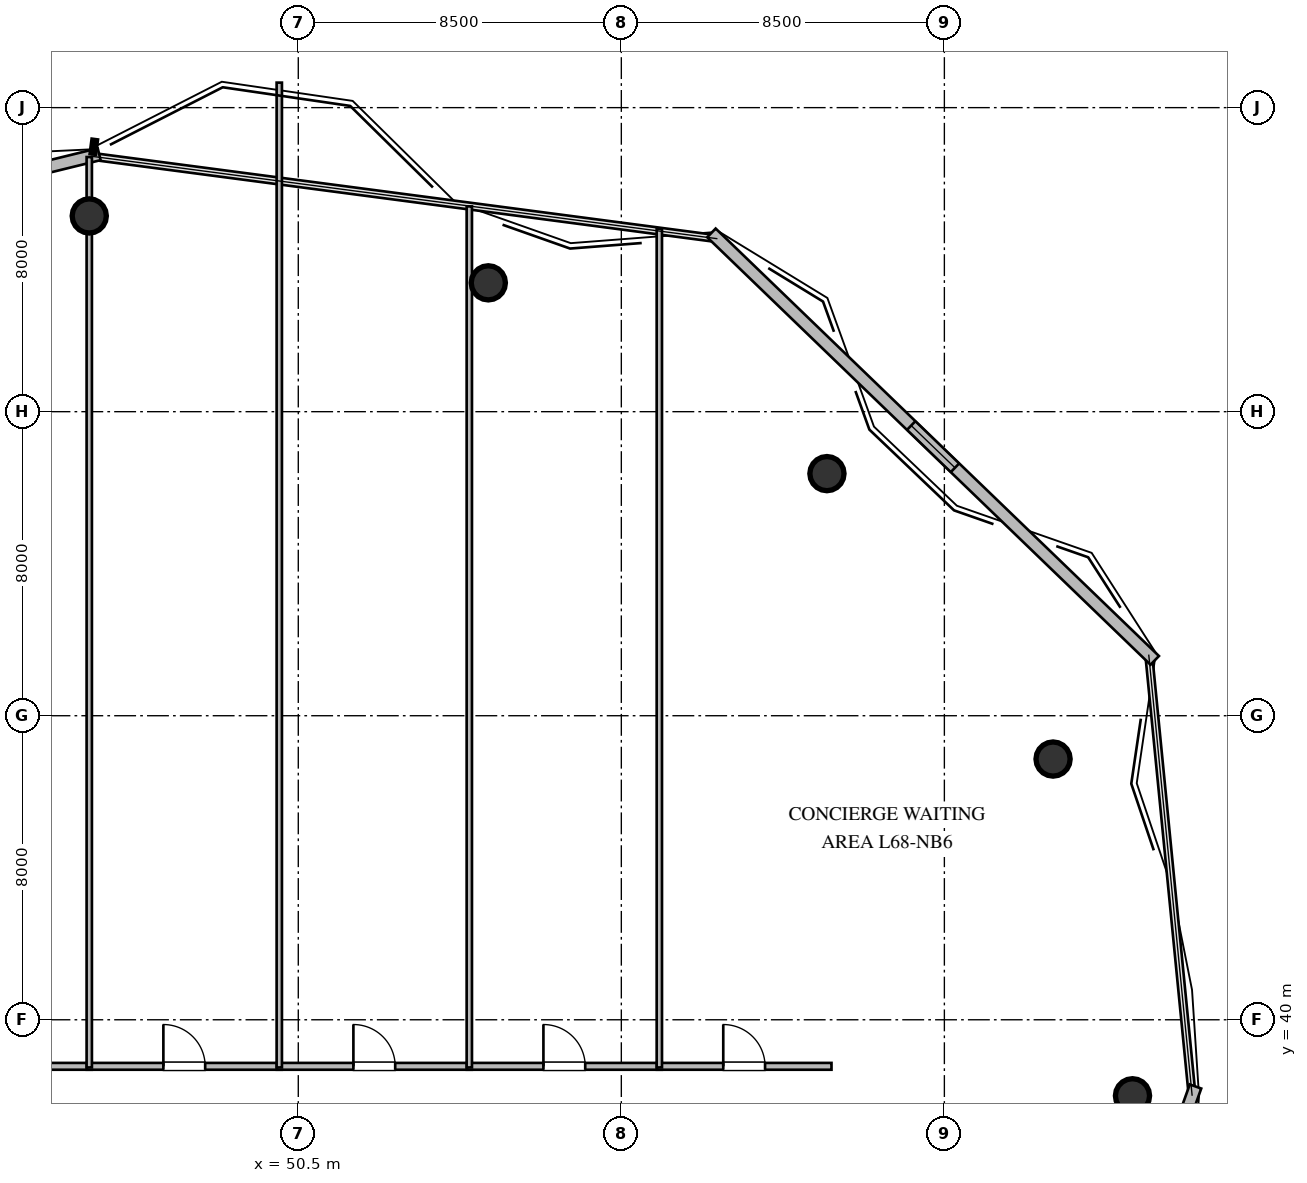
"""IFC4 building model, lengths in metres.
Left out: names, types, materials, properties, quantities, classifications, styles, units other than length and angle.
Written with IfcOpenShell. Run it as: python <this file> out.ifc"""

import sys

from ifc_helpers import new_model, si_unit, direction, frame, frame_2d, origin, origin_2d, place, context, subcontext, project, spatial, rectangle, circle, extrude, element, fill, save


model = new_model("IFC4")
c1 = context("Model", 3, precision=1e-05, world=origin(), true_north=direction((0.0, 1.0)))
c2 = subcontext(c1, "Body", "Model", "MODEL_VIEW")
j1 = project(units=[si_unit("LENGTHUNIT", "METRE"), si_unit("PLANEANGLEUNIT", "RADIAN")], contexts=[c1])
p1 = place(None, origin())
s1 = spatial("IfcSite", under=j1, at=p1, CompositionType="ELEMENT")
p2 = place(p1, origin())
s2 = spatial("IfcBuilding", under=s1, at=p2, CompositionType="ELEMENT")
p3 = place(p2, frame((0.0, 0.0, 258.6)))
s3 = spatial("IfcBuildingStorey", under=s2, at=p3, CompositionType="ELEMENT", Elevation=258.6)
for number, where, z_axis, x_axis in (
    (1, (72.45, 38.0, -0.24), (0.0, 0.0, 1.0), (1.0, 0.0, 0.0)),
    (2, (70.36, 46.86, -0.24), (0.0, 0.0, 1.0), (1.0, 0.0, 0.0)),
    (3, (64.41, 54.37, -0.24), (0.0, 0.0, 1.0), (1.0, 0.0, 0.0)),
    (4, (55.5, 59.39, -0.24), (0.0, 0.0, 1.0), (1.0, 0.0, 0.0)),
    (5, (45.0, 61.15, -0.24), (0.0, 0.0, 1.0), (1.0, 0.0, 0.0)),
):
    element("IfcColumn", number, at=place(p3, frame(where, z_axis=z_axis, x_axis=x_axis)), inside=s3, PredefinedType="COLUMN", context=c2, shape_type="SweptSolid", body=[
        extrude(circle(Radius=0.45, at=origin_2d()), origin(), (0.0, 0.0, 1.0), 4.04),
    ])
p4 = place(p3, frame((74.108, 38.245, 0.0), z_axis=(0.0, 0.0, 1.0), x_axis=(-0.337073777429, -0.941478235845, 0.0)))
e6 = element("IfcWall", 6, at=p4, inside=s3, PredefinedType="STANDARD", context=c2, shape_type="SweptSolid", body=[
    extrude(rectangle(XDim=13.673, YDim=0.32, at=frame_2d((6.837, 0.0))), origin(), (0.0, 0.0, 1.0), 3.56),
])
p5 = place(p3, frame((29.293, 58.852, 0.0), z_axis=(0.0, 0.0, 1.0), x_axis=(0.971137749742, 0.238519330508, 0.0)))
e7 = element("IfcWall", 7, at=p5, inside=s3, PredefinedType="STANDARD", context=c2, shape_type="SweptSolid", body=[
    extrude(rectangle(XDim=16.443, YDim=0.32, at=frame_2d((8.221, 0.0))), origin(), (0.0, 0.0, 1.0), 3.56),
])
p6 = place(p5, frame((7.421, 0.0, 1.05)))
e8 = element("IfcOpeningElement", 8, at=p6, cuts=e7, PredefinedType="OPENING", context=c2, shape_type="SweptSolid", body=[
    extrude(rectangle(XDim=1.6, YDim=1.5, at=frame_2d((0.8, 0.75))), frame((0.0, 0.17, 0.0), z_axis=(0.0, -1.0, 0.0), x_axis=(1.0, 0.0, 0.0)), (0.0, 0.0, 1.0), 0.34),
])
p7 = place(p3, frame((61.371, 60.704, 0.0), z_axis=(0.0, 0.0, 1.0), x_axis=(0.719819827488, -0.694160943842, 0.0)))
e9 = element("IfcWall", 9, at=p7, inside=s3, PredefinedType="STANDARD", context=c2, shape_type="SweptSolid", body=[
    extrude(rectangle(XDim=16.204, YDim=0.32, at=frame_2d((8.102, 0.0))), origin(), (0.0, 0.0, 1.0), 3.56),
])
p8 = place(p7, frame((7.302, 0.0, 1.05)))
e10 = element("IfcOpeningElement", 10, at=p8, cuts=e9, PredefinedType="OPENING", context=c2, shape_type="SweptSolid", body=[
    extrude(rectangle(XDim=1.6, YDim=1.5, at=frame_2d((0.8, 0.75))), frame((0.0, 0.17, 0.0), z_axis=(0.0, -1.0, 0.0), x_axis=(1.0, 0.0, 0.0)), (0.0, 0.0, 1.0), 0.34),
])
p9 = place(p3, frame((39.935, 38.775, 0.0), z_axis=(0.0, 0.0, 1.0), x_axis=(1.0, 0.0, 0.0)))
e11 = element("IfcWall", 11, at=p9, inside=s3, PredefinedType="PARTITIONING", context=c2, shape_type="SweptSolid", body=[
    extrude(rectangle(XDim=5.13, YDim=0.18, at=frame_2d((2.565, 0.0))), origin(), (0.0, 0.0, 1.0), 3.56),
])
p10 = place(p9, frame((2.015, 0.0, 0.0)))
e12 = element("IfcOpeningElement", 12, at=p10, cuts=e11, PredefinedType="OPENING", context=c2, shape_type="SweptSolid", body=[
    extrude(rectangle(XDim=1.1, YDim=2.1, at=frame_2d((0.55, 1.05))), frame((0.0, 0.1, 0.0), z_axis=(0.0, -1.0, 0.0), x_axis=(1.0, 0.0, 0.0)), (0.0, 0.0, 1.0), 0.2),
])
p11 = place(p3, frame((44.935, 38.775, 0.0), z_axis=(0.0, 0.0, 1.0), x_axis=(1.0, 0.0, 0.0)))
e13 = element("IfcWall", 13, at=p11, inside=s3, PredefinedType="PARTITIONING", context=c2, shape_type="SweptSolid", body=[
    extrude(rectangle(XDim=5.13, YDim=0.18, at=frame_2d((2.565, 0.0))), origin(), (0.0, 0.0, 1.0), 3.56),
])
p12 = place(p11, frame((2.015, 0.0, 0.0)))
e14 = element("IfcOpeningElement", 14, at=p12, cuts=e13, PredefinedType="OPENING", context=c2, shape_type="SweptSolid", body=[
    extrude(rectangle(XDim=1.1, YDim=2.1, at=frame_2d((0.55, 1.05))), frame((0.0, 0.1, 0.0), z_axis=(0.0, -1.0, 0.0), x_axis=(1.0, 0.0, 0.0)), (0.0, 0.0, 1.0), 0.2),
])
p13 = place(p3, frame((49.935, 38.775, 0.0), z_axis=(0.0, 0.0, 1.0), x_axis=(1.0, 0.0, 0.0)))
e15 = element("IfcWall", 15, at=p13, inside=s3, PredefinedType="PARTITIONING", context=c2, shape_type="SweptSolid", body=[
    extrude(rectangle(XDim=5.13, YDim=0.18, at=frame_2d((2.565, 0.0))), origin(), (0.0, 0.0, 1.0), 3.56),
])
p14 = place(p13, frame((2.015, 0.0, 0.0)))
e16 = element("IfcOpeningElement", 16, at=p14, cuts=e15, PredefinedType="OPENING", context=c2, shape_type="SweptSolid", body=[
    extrude(rectangle(XDim=1.1, YDim=2.1, at=frame_2d((0.55, 1.05))), frame((0.0, 0.1, 0.0), z_axis=(0.0, -1.0, 0.0), x_axis=(1.0, 0.0, 0.0)), (0.0, 0.0, 1.0), 0.2),
])
p15 = place(p3, frame((54.935, 38.775, 0.0), z_axis=(0.0, 0.0, 1.0), x_axis=(1.0, 0.0, 0.0)))
e17 = element("IfcWall", 17, at=p15, inside=s3, PredefinedType="PARTITIONING", context=c2, shape_type="SweptSolid", body=[
    extrude(rectangle(XDim=5.13, YDim=0.18, at=frame_2d((2.565, 0.0))), origin(), (0.0, 0.0, 1.0), 3.56),
])
p16 = place(p15, frame((2.015, 0.0, 0.0)))
e18 = element("IfcOpeningElement", 18, at=p16, cuts=e17, PredefinedType="OPENING", context=c2, shape_type="SweptSolid", body=[
    extrude(rectangle(XDim=1.1, YDim=2.1, at=frame_2d((0.55, 1.05))), frame((0.0, 0.1, 0.0), z_axis=(0.0, -1.0, 0.0), x_axis=(1.0, 0.0, 0.0)), (0.0, 0.0, 1.0), 0.2),
])
p17 = place(p3, frame((59.935, 38.775, 0.0), z_axis=(0.0, 0.0, 1.0), x_axis=(1.0, 0.0, 0.0)))
e19 = element("IfcWall", 19, at=p17, inside=s3, PredefinedType="PARTITIONING", context=c2, shape_type="SweptSolid", body=[
    extrude(rectangle(XDim=4.595, YDim=0.18, at=frame_2d((2.297, 0.0))), origin(), (0.0, 0.0, 1.0), 3.56),
])
p18 = place(p17, frame((1.747, 0.0, 0.0)))
e20 = element("IfcOpeningElement", 20, at=p18, cuts=e19, PredefinedType="OPENING", context=c2, shape_type="SweptSolid", body=[
    extrude(rectangle(XDim=1.1, YDim=2.1, at=frame_2d((0.55, 1.05))), frame((0.0, 0.1, 0.0), z_axis=(0.0, -1.0, 0.0), x_axis=(1.0, 0.0, 0.0)), (0.0, 0.0, 1.0), 0.2),
])
p19 = place(p3, frame((45.0, 62.7, 0.0), z_axis=(0.0, 0.0, 1.0), x_axis=(0.0, -1.0, 0.0)))
e21 = element("IfcWall", 21, at=p19, inside=s3, PredefinedType="PARTITIONING", context=c2, shape_type="SweptSolid", body=[
    extrude(rectangle(XDim=23.955, YDim=0.14, at=frame_2d((11.978, 0.0))), origin(), (0.0, 0.0, 1.0), 3.006),
])
p20 = place(p3, frame((50.0, 64.658, 0.0), z_axis=(0.0, 0.0, 1.0), x_axis=(0.0, -1.0, 0.0)))
e22 = element("IfcWall", 22, at=p20, inside=s3, PredefinedType="PARTITIONING", context=c2, shape_type="SweptSolid", body=[
    extrude(rectangle(XDim=25.913, YDim=0.14, at=frame_2d((12.957, 0.0))), origin(), (0.0, 0.0, 1.0), 3.56),
])
p21 = place(p3, frame((55.0, 61.401, 0.0), z_axis=(0.0, 0.0, 1.0), x_axis=(0.0, -1.0, 0.0)))
e23 = element("IfcWall", 23, at=p21, inside=s3, PredefinedType="PARTITIONING", context=c2, shape_type="SweptSolid", body=[
    extrude(rectangle(XDim=22.656, YDim=0.14, at=frame_2d((11.328, 0.0))), origin(), (0.0, 0.0, 1.0), 3.56),
])
p22 = place(p3, frame((60.0, 60.813, 0.0), z_axis=(0.0, 0.0, 1.0), x_axis=(0.0, -1.0, 0.0)))
e24 = element("IfcWall", 24, at=p22, inside=s3, PredefinedType="PARTITIONING", context=c2, shape_type="SweptSolid", body=[
    extrude(rectangle(XDim=22.068, YDim=0.14, at=frame_2d((11.034, 0.0))), origin(), (0.0, 0.0, 1.0), 3.56),
])
p23 = place(p8, origin())
e25 = element("IfcWindow", 25, at=p23, inside=s3, PartitioningType="SINGLE_PANEL", PredefinedType="WINDOW", context=c2, shape_type="SweptSolid", body=[
    extrude(rectangle(XDim=1.6, YDim=1.5, at=frame_2d((0.8, 0.75))), frame((0.0, 0.03, 0.0), z_axis=(0.0, -1.0, 0.0), x_axis=(1.0, 0.0, 0.0)), (0.0, 0.0, 1.0), 0.06),
])
fill(e10, e25)
p24 = place(p12, origin())
e26 = element("IfcDoor", 26, at=p24, inside=s3, OperationType="SINGLE_SWING_LEFT", PredefinedType="DOOR", context=c2, shape_type="SweptSolid", body=[
    extrude(rectangle(XDim=1.1, YDim=2.1, at=frame_2d((0.55, 1.05))), frame((0.0, 0.025, 0.0), z_axis=(0.0, -1.0, 0.0), x_axis=(1.0, 0.0, 0.0)), (0.0, 0.0, 1.0), 0.05),
])
fill(e14, e26)
p25 = place(p14, origin())
e27 = element("IfcDoor", 27, at=p25, inside=s3, OperationType="SINGLE_SWING_LEFT", PredefinedType="DOOR", context=c2, shape_type="SweptSolid", body=[
    extrude(rectangle(XDim=1.1, YDim=2.1, at=frame_2d((0.55, 1.05))), frame((0.0, 0.025, 0.0), z_axis=(0.0, -1.0, 0.0), x_axis=(1.0, 0.0, 0.0)), (0.0, 0.0, 1.0), 0.05),
])
fill(e16, e27)
p26 = place(p16, origin())
e28 = element("IfcDoor", 28, at=p26, inside=s3, OperationType="SINGLE_SWING_LEFT", PredefinedType="DOOR", context=c2, shape_type="SweptSolid", body=[
    extrude(rectangle(XDim=1.1, YDim=2.1, at=frame_2d((0.55, 1.05))), frame((0.0, 0.025, 0.0), z_axis=(0.0, -1.0, 0.0), x_axis=(1.0, 0.0, 0.0)), (0.0, 0.0, 1.0), 0.05),
])
fill(e18, e28)
p27 = place(p18, origin())
e29 = element("IfcDoor", 29, at=p27, inside=s3, OperationType="SINGLE_SWING_LEFT", PredefinedType="DOOR", context=c2, shape_type="SweptSolid", body=[
    extrude(rectangle(XDim=1.1, YDim=2.1, at=frame_2d((0.55, 1.05))), frame((0.0, 0.025, 0.0), z_axis=(0.0, -1.0, 0.0), x_axis=(1.0, 0.0, 0.0)), (0.0, 0.0, 1.0), 0.05),
])
fill(e20, e29)
save(model, sys.argv[1])
